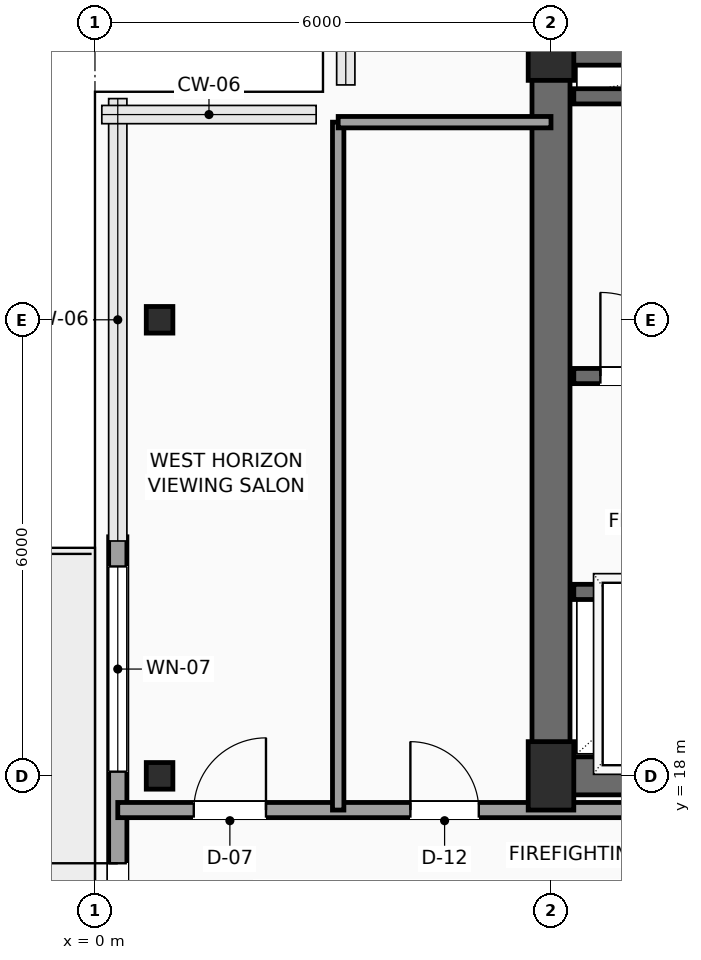
"""IFC4 building model, lengths in metres.
Left out: names, types, materials, properties, quantities, classifications, styles, units other than length and angle.
Written with IfcOpenShell. Run it as: python <this file> out.ifc"""

import sys

from ifc_helpers import new_model, si_unit, direction, frame, frame_2d, origin, origin_2d, place, context, subcontext, project, spatial, rectangle, hollow_rectangle, extrude, element, fill, save


model = new_model("IFC4")
c1 = context("Model", 3, precision=1e-05, world=origin(), true_north=direction((0.0, 1.0)))
c2 = subcontext(c1, "Body", "Model", "MODEL_VIEW")
j1 = project(units=[si_unit("LENGTHUNIT", "METRE"), si_unit("PLANEANGLEUNIT", "RADIAN")], contexts=[c1])
p1 = place(None, origin())
s1 = spatial("IfcSite", under=j1, at=p1, CompositionType="ELEMENT")
p2 = place(p1, origin())
s2 = spatial("IfcBuilding", under=s1, at=p2, CompositionType="ELEMENT")
p3 = place(p2, frame((0.0, 0.0, 296.4)))
s3 = spatial("IfcBuildingStorey", under=s2, at=p3, CompositionType="ELEMENT", Elevation=296.4)
for number, where, z_axis, x_axis in (
    (1, (6.0, 18.0, 0.0), (0.0, 0.0, 1.0), (1.0, 0.0, 0.0)),
    (2, (6.0, 27.6, 0.0), (0.0, 0.0, 1.0), (1.0, 0.0, 0.0)),
):
    element("IfcColumn", number, at=place(p3, frame(where, z_axis=z_axis, x_axis=x_axis)), inside=s3, PredefinedType="COLUMN", context=c2, shape_type="SweptSolid", body=[
        extrude(rectangle(XDim=0.6, YDim=0.9, at=origin_2d()), origin(), (0.0, 0.0, 1.0), 4.5),
    ])
for number, where, z_axis, x_axis in (
    (3, (0.85, 18.0, 0.0), (0.0, 0.0, 1.0), (1.0, 0.0, 0.0)),
    (4, (0.85, 24.0, 0.0), (0.0, 0.0, 1.0), (1.0, 0.0, 0.0)),
):
    element("IfcColumn", number, at=place(p3, frame(where, z_axis=z_axis, x_axis=x_axis)), inside=s3, PredefinedType="COLUMN", context=c2, shape_type="SweptSolid", body=[
        extrude(hollow_rectangle(XDim=0.35, YDim=0.35, WallThickness=0.016, InnerFilletRadius=0.016, OuterFilletRadius=0.032, at=origin_2d()), origin(), (0.0, 0.0, 1.0), 4.5),
    ])
p4 = place(p3, frame((0.3, 11.855, 0.0), z_axis=(0.0, 0.0, 1.0), x_axis=(0.0, 1.0, 0.0)))
e5 = element("IfcWall", 5, at=p4, inside=s3, PredefinedType="SOLIDWALL", context=c2, shape_type="SweptSolid", body=[
    extrude(rectangle(XDim=9.29, YDim=0.24, at=frame_2d((4.645, 0.0))), origin(), (0.0, 0.0, 1.0), 4.225),
])
p5 = place(p4, frame((3.945, 0.0, 0.0)))
e6 = element("IfcOpeningElement", 6, at=p5, cuts=e5, PredefinedType="OPENING", context=c2, shape_type="SweptSolid", body=[
    extrude(rectangle(XDim=1.05, YDim=2.2, at=frame_2d((0.525, 1.1))), frame((0.0, 0.13, 0.0), z_axis=(0.0, -1.0, 0.0), x_axis=(1.0, 0.0, 0.0)), (0.0, 0.0, 1.0), 0.26),
])
p6 = place(p4, frame((6.2, 0.0, 0.6)))
e7 = element("IfcOpeningElement", 7, at=p6, cuts=e5, PredefinedType="OPENING", context=c2, shape_type="SweptSolid", body=[
    extrude(rectangle(XDim=2.7, YDim=2.3, at=frame_2d((1.35, 1.15))), frame((0.0, 0.13, 0.0), z_axis=(0.0, -1.0, 0.0), x_axis=(1.0, 0.0, 0.0)), (0.0, 0.0, 1.0), 0.26),
])
p7 = place(p4, frame((0.7, 0.0, 0.6)))
e8 = element("IfcOpeningElement", 8, at=p7, cuts=e5, PredefinedType="OPENING", context=c2, shape_type="SweptSolid", body=[
    extrude(rectangle(XDim=0.9, YDim=2.2, at=frame_2d((0.45, 1.1))), frame((0.0, 0.13, 0.0), z_axis=(0.0, -1.0, 0.0), x_axis=(1.0, 0.0, 0.0)), (0.0, 0.0, 1.0), 0.26),
])
p8 = place(p3, frame((6.0, 18.0, 0.0), z_axis=(0.0, 0.0, 1.0), x_axis=(1.0, 0.0, 0.0)))
e9 = element("IfcWall", 9, at=p8, inside=s3, PredefinedType="SHEAR", context=c2, shape_type="SweptSolid", body=[
    extrude(rectangle(XDim=12.0, YDim=0.5, at=frame_2d((6.0, 0.0))), origin(), (0.0, 0.0, 1.0), 4.225),
])
p9 = place(p8, frame((7.15, 0.0, 0.0)))
e10 = element("IfcOpeningElement", 10, at=p9, cuts=e9, PredefinedType="OPENING", context=c2, shape_type="SweptSolid", body=[
    extrude(rectangle(XDim=1.6, YDim=2.3, at=frame_2d((0.8, 1.15))), frame((0.0, 0.26, 0.0), z_axis=(0.0, -1.0, 0.0), x_axis=(1.0, 0.0, 0.0)), (0.0, 0.0, 1.0), 0.52),
])
p10 = place(p3, frame((6.0, 27.6, 0.0), z_axis=(0.0, 0.0, 1.0), x_axis=(1.0, 0.0, 0.0)))
e11 = element("IfcWall", 11, at=p10, inside=s3, PredefinedType="SHEAR", context=c2, shape_type="SweptSolid", body=[
    extrude(rectangle(XDim=12.0, YDim=0.5, at=frame_2d((6.0, 0.0))), origin(), (0.0, 0.0, 1.0), 4.225),
])
p11 = place(p10, frame((10.3, 0.0, 0.0)))
e12 = element("IfcOpeningElement", 12, at=p11, cuts=e11, PredefinedType="OPENING", context=c2, shape_type="SweptSolid", body=[
    extrude(rectangle(XDim=0.9, YDim=2.15, at=frame_2d((0.45, 1.075))), frame((0.0, 0.26, 0.0), z_axis=(0.0, -1.0, 0.0), x_axis=(1.0, 0.0, 0.0)), (0.0, 0.0, 1.0), 0.52),
])
p12 = place(p3, frame((6.0, 18.0, 0.0), z_axis=(0.0, 0.0, 1.0), x_axis=(0.0, 1.0, 0.0)))
e13 = element("IfcWall", 13, at=p12, inside=s3, PredefinedType="SHEAR", context=c2, shape_type="SweptSolid", body=[
    extrude(rectangle(XDim=9.6, YDim=0.5, at=frame_2d((4.8, 0.0))), origin(), (0.0, 0.0, 1.0), 4.225),
])
p13 = place(p3, frame((6.3, 23.26, 0.0), z_axis=(0.0, 0.0, 1.0), x_axis=(1.0, 0.0, 0.0)))
e14 = element("IfcWall", 14, at=p13, inside=s3, PredefinedType="SHEAR", context=c2, shape_type="SweptSolid", body=[
    extrude(rectangle(XDim=8.88, YDim=0.2, at=frame_2d((4.44, 0.0))), origin(), (0.0, 0.0, 1.0), 4.225),
])
p14 = place(p13, frame((0.35, 0.0, 0.0)))
e15 = element("IfcOpeningElement", 15, at=p14, cuts=e14, PredefinedType="OPENING", context=c2, shape_type="SweptSolid", body=[
    extrude(rectangle(XDim=1.1, YDim=2.2, at=frame_2d((0.55, 1.1))), frame((0.0, 0.11, 0.0), z_axis=(0.0, -1.0, 0.0), x_axis=(1.0, 0.0, 0.0)), (0.0, 0.0, 1.0), 0.22),
])
p15 = place(p3, frame((6.3, 26.94, 0.0), z_axis=(0.0, 0.0, 1.0), x_axis=(1.0, 0.0, 0.0)))
e16 = element("IfcWall", 16, at=p15, inside=s3, PredefinedType="SHEAR", context=c2, shape_type="SweptSolid", body=[
    extrude(rectangle(XDim=8.88, YDim=0.2, at=frame_2d((4.44, 0.0))), origin(), (0.0, 0.0, 1.0), 4.225),
])
p16 = place(p3, frame((6.3, 20.42, 0.0), z_axis=(0.0, 0.0, 1.0), x_axis=(1.0, 0.0, 0.0)))
e17 = element("IfcWall", 17, at=p16, inside=s3, PredefinedType="SHEAR", context=c2, shape_type="SweptSolid", body=[
    extrude(rectangle(XDim=4.95, YDim=0.2, at=frame_2d((2.475, 0.0))), origin(), (0.0, 0.0, 1.0), 4.225),
])
p17 = place(p16, frame((0.65, 0.0, 0.0)))
e18 = element("IfcOpeningElement", 18, at=p17, cuts=e17, PredefinedType="OPENING", context=c2, shape_type="SweptSolid", body=[
    extrude(rectangle(XDim=1.1, YDim=2.2, at=frame_2d((0.55, 1.1))), frame((0.0, 0.11, 0.0), z_axis=(0.0, -1.0, 0.0), x_axis=(1.0, 0.0, 0.0)), (0.0, 0.0, 1.0), 0.22),
])
p18 = place(p16, frame((3.05, 0.0, 0.0)))
e19 = element("IfcOpeningElement", 19, at=p18, cuts=e17, PredefinedType="OPENING", context=c2, shape_type="SweptSolid", body=[
    extrude(rectangle(XDim=1.1, YDim=2.2, at=frame_2d((0.55, 1.1))), frame((0.0, 0.11, 0.0), z_axis=(0.0, -1.0, 0.0), x_axis=(1.0, 0.0, 0.0)), (0.0, 0.0, 1.0), 0.22),
])
p19 = place(p3, frame((0.3, 17.55, 0.0), z_axis=(0.0, 0.0, 1.0), x_axis=(1.0, 0.0, 0.0)))
e20 = element("IfcWall", 20, at=p19, inside=s3, PredefinedType="SOLIDWALL", context=c2, shape_type="SweptSolid", body=[
    extrude(rectangle(XDim=12.3, YDim=0.2, at=frame_2d((6.15, 0.0))), origin(), (0.0, 0.0, 1.0), 4.225),
])
p20 = place(p19, frame((1.0, 0.0, 0.0)))
e21 = element("IfcOpeningElement", 21, at=p20, cuts=e20, PredefinedType="OPENING", context=c2, shape_type="SweptSolid", body=[
    extrude(rectangle(XDim=0.95, YDim=2.15, at=frame_2d((0.475, 1.075))), frame((0.0, 0.11, 0.0), z_axis=(0.0, -1.0, 0.0), x_axis=(1.0, 0.0, 0.0)), (0.0, 0.0, 1.0), 0.22),
])
p21 = place(p19, frame((3.85, 0.0, 0.0)))
e22 = element("IfcOpeningElement", 22, at=p21, cuts=e20, PredefinedType="OPENING", context=c2, shape_type="SweptSolid", body=[
    extrude(rectangle(XDim=0.9, YDim=2.1, at=frame_2d((0.45, 1.05))), frame((0.0, 0.11, 0.0), z_axis=(0.0, -1.0, 0.0), x_axis=(1.0, 0.0, 0.0)), (0.0, 0.0, 1.0), 0.22),
])
p22 = place(p3, frame((3.2, 17.55, 0.0), z_axis=(0.0, 0.0, 1.0), x_axis=(0.0, 1.0, 0.0)))
e23 = element("IfcWall", 23, at=p22, inside=s3, PredefinedType="PARTITIONING", context=c2, shape_type="SweptSolid", body=[
    extrude(rectangle(XDim=9.05, YDim=0.15, at=frame_2d((4.525, 0.0))), origin(), (0.0, 0.0, 1.0), 4.225),
])
p23 = place(p3, frame((3.2, 26.6, 0.0), z_axis=(0.0, 0.0, 1.0), x_axis=(1.0, 0.0, 0.0)))
e24 = element("IfcWall", 24, at=p23, inside=s3, PredefinedType="PARTITIONING", context=c2, shape_type="SweptSolid", body=[
    extrude(rectangle(XDim=2.8, YDim=0.15, at=frame_2d((1.4, 0.0))), origin(), (0.0, 0.0, 1.0), 4.225),
])
p24 = place(p5, origin())
e25 = element("IfcDoor", 25, at=p24, inside=s3, OperationType="SINGLE_SWING_RIGHT", PredefinedType="DOOR", context=c2, shape_type="SweptSolid", body=[
    extrude(rectangle(XDim=1.05, YDim=2.2, at=frame_2d((0.525, 1.1))), frame((0.0, 0.025, 0.0), z_axis=(0.0, -1.0, 0.0), x_axis=(1.0, 0.0, 0.0)), (0.0, 0.0, 1.0), 0.05),
])
fill(e6, e25)
p25 = place(p6, origin())
e26 = element("IfcWindow", 26, at=p25, inside=s3, PartitioningType="SINGLE_PANEL", PredefinedType="WINDOW", context=c2, shape_type="SweptSolid", body=[
    extrude(rectangle(XDim=2.7, YDim=2.3, at=frame_2d((1.35, 1.15))), frame((0.0, 0.03, 0.0), z_axis=(0.0, -1.0, 0.0), x_axis=(1.0, 0.0, 0.0)), (0.0, 0.0, 1.0), 0.06),
])
fill(e7, e26)
p26 = place(p14, origin())
e27 = element("IfcDoor", 27, at=p26, inside=s3, OperationType="SINGLE_SWING_LEFT", PredefinedType="DOOR", context=c2, shape_type="SweptSolid", body=[
    extrude(rectangle(XDim=1.1, YDim=2.2, at=frame_2d((0.55, 1.1))), frame((0.0, 0.025, 0.0), z_axis=(0.0, -1.0, 0.0), x_axis=(1.0, 0.0, 0.0)), (0.0, 0.0, 1.0), 0.05),
])
fill(e15, e27)
p27 = place(p20, origin())
e28 = element("IfcDoor", 28, at=p27, inside=s3, OperationType="SINGLE_SWING_RIGHT", PredefinedType="DOOR", context=c2, shape_type="SweptSolid", body=[
    extrude(rectangle(XDim=0.95, YDim=2.15, at=frame_2d((0.475, 1.075))), frame((0.0, 0.025, 0.0), z_axis=(0.0, -1.0, 0.0), x_axis=(1.0, 0.0, 0.0)), (0.0, 0.0, 1.0), 0.05),
])
fill(e21, e28)
p28 = place(p21, origin())
e29 = element("IfcDoor", 29, at=p28, inside=s3, OperationType="SINGLE_SWING_LEFT", PredefinedType="DOOR", context=c2, shape_type="SweptSolid", body=[
    extrude(rectangle(XDim=0.9, YDim=2.1, at=frame_2d((0.45, 1.05))), frame((0.0, 0.025, 0.0), z_axis=(0.0, -1.0, 0.0), x_axis=(1.0, 0.0, 0.0)), (0.0, 0.0, 1.0), 0.05),
])
fill(e22, e29)
save(model, sys.argv[1])
